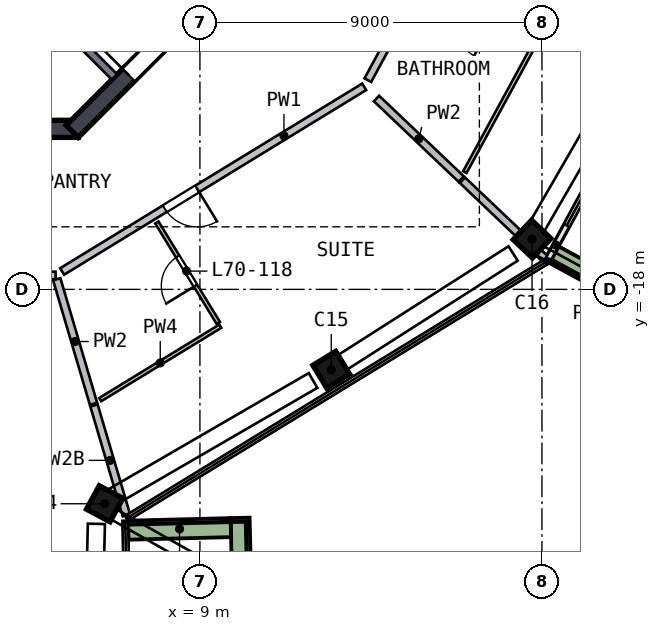
"""IFC4 building model, lengths in metres.
Left out: names, types, materials, properties, quantities, classifications, styles, units other than length and angle.
Written with IfcOpenShell. Run it as: python <this file> out.ifc"""

import sys

from ifc_helpers import new_model, si_unit, direction, frame, frame_2d, origin, origin_2d, place, context, subcontext, project, spatial, rectangle, extrude, element, fill, save


model = new_model("IFC4")
c1 = context("Model", 3, precision=1e-05, world=origin(), true_north=direction((0.0, 1.0)))
c2 = subcontext(c1, "Body", "Model", "MODEL_VIEW")
j1 = project(units=[si_unit("LENGTHUNIT", "METRE"), si_unit("PLANEANGLEUNIT", "RADIAN")], contexts=[c1])
p1 = place(None, origin())
s1 = spatial("IfcSite", under=j1, at=p1, CompositionType="ELEMENT")
p2 = place(p1, origin())
s2 = spatial("IfcBuilding", under=s1, at=p2, CompositionType="ELEMENT")
p3 = place(p2, frame((0.0, 0.0, 284.5)))
s3 = spatial("IfcBuildingStorey", under=s2, at=p3, CompositionType="ELEMENT", Elevation=284.5)
p4 = place(p3, frame((6.357, -23.679, 0.0), z_axis=(0.112271524, 0.03116542, 0.993188714), x_axis=(-0.47042906, -0.878735238, 0.080751965)))
e1 = element("IfcColumn", 1, at=p4, inside=s3, PredefinedType="COLUMN", context=c2, shape_type="SweptSolid", body=[
    extrude(rectangle(XDim=0.7, YDim=0.7, at=origin_2d()), origin(), (0.0, 0.0, 1.0), 3.212),
])
p5 = place(p3, frame((12.34, -20.185, 0.0), z_axis=(0.095516489, 0.05954571, 0.993645263), x_axis=(0.847642965, 0.518491285, -0.112553057)))
e2 = element("IfcColumn", 2, at=p5, inside=s3, PredefinedType="COLUMN", context=c2, shape_type="SweptSolid", body=[
    extrude(rectangle(XDim=0.7, YDim=0.7, at=origin_2d()), origin(), (0.0, 0.0, 1.0), 3.21),
])
p6 = place(p3, frame((17.644, -16.779, 0.0), z_axis=(0.079060431, 0.084609865, 0.993272681), x_axis=(-0.684283954, -0.719963223, 0.115794763)))
e3 = element("IfcColumn", 3, at=p6, inside=s3, PredefinedType="COLUMN", context=c2, shape_type="SweptSolid", body=[
    extrude(rectangle(XDim=0.7, YDim=0.7, at=origin_2d()), origin(), (0.0, 0.0, 1.0), 3.211),
])
p7 = place(p3, frame((-5.799, -13.775, 0.0), z_axis=(0.0, 0.0, 1.0), x_axis=(1.0, 0.0, 0.0)))
e4 = element("IfcWall", 4, at=p7, inside=s3, PredefinedType="SHEAR", context=c2, shape_type="SweptSolid", body=[
    extrude(rectangle(XDim=11.598, YDim=0.45, at=frame_2d((5.799, 0.0))), origin(), (0.0, 0.0, 1.0), 3.5),
])
p8 = place(p3, frame((5.64, -13.841, 0.0), z_axis=(0.0, 0.0, 1.0), x_axis=(0.707106781, 0.707106781, 0.0)))
e5 = element("IfcWall", 5, at=p8, inside=s3, PredefinedType="SHEAR", context=c2, shape_type="SweptSolid", body=[
    extrude(rectangle(XDim=11.598, YDim=0.45, at=frame_2d((5.799, 0.0))), origin(), (0.0, 0.0, 1.0), 3.5),
])
p9 = place(p8, frame((2.099, 0.0, 0.0)))
e6 = element("IfcOpeningElement", 6, at=p9, cuts=e5, PredefinedType="OPENING", context=c2, shape_type="SweptSolid", body=[
    extrude(rectangle(XDim=1.2, YDim=2.1, at=frame_2d((0.6, 1.05))), frame((0.0, 0.235, 0.0), z_axis=(0.0, -1.0, 0.0), x_axis=(1.0, 0.0, 0.0)), (0.0, 0.0, 1.0), 0.47),
])
p10 = place(p3, frame((18.181, -17.183, 0.0), z_axis=(0.0, 0.0, 1.0), x_axis=(0.478120193, 0.878294416, 0.0)))
e7 = element("IfcWall", 7, at=p10, inside=s3, PredefinedType="SOLIDWALL", context=c2, shape_type="SweptSolid", body=[
    extrude(rectangle(XDim=3.787, YDim=0.15, at=frame_2d((1.894, 0.0))), origin(), (0.0, 0.0, 1.0), 2.525),
])
p11 = place(p10, frame((0.987, 0.0, 0.0)))
e8 = element("IfcOpeningElement", 8, at=p11, cuts=e7, PredefinedType="OPENING", context=c2, shape_type="SweptSolid", body=[
    extrude(rectangle(XDim=2.4, YDim=2.4, at=frame_2d((1.2, 1.2))), frame((0.0, 0.085, 0.0), z_axis=(0.0, -1.0, 0.0), x_axis=(1.0, 0.0, 0.0)), (0.0, 0.0, 1.0), 0.17),
])
p12 = place(p3, frame((10.27, -32.506, 0.0), z_axis=(0.0, 0.0, 1.0), x_axis=(-0.025115681, 0.999684552, 0.0)))
e9 = element("IfcWall", 9, at=p12, inside=s3, PredefinedType="SOLIDWALL", context=c2, shape_type="SweptSolid", body=[
    extrude(rectangle(XDim=8.496, YDim=0.5, at=frame_2d((4.248, 0.0))), origin(), (0.0, 0.0, 1.0), 0.7),
])
p13 = place(p3, frame((9.813, -24.269, 0.0), z_axis=(0.0, 0.0, 1.0), x_axis=(-0.999683793, -0.025145864, 0.0)))
e10 = element("IfcWall", 10, at=p13, inside=s3, PredefinedType="SOLIDWALL", context=c2, shape_type="SweptSolid", body=[
    extrude(rectangle(XDim=2.699, YDim=0.5, at=frame_2d((1.35, 0.0))), origin(), (0.0, 0.0, 1.0), 0.7),
])
p14 = place(p3, frame((18.319, -17.087, 0.0), z_axis=(0.0, 0.0, 1.0), x_axis=(0.878332693, -0.478049873, 0.0)))
e11 = element("IfcWall", 11, at=p14, inside=s3, PredefinedType="SOLIDWALL", context=c2, shape_type="SweptSolid", body=[
    extrude(rectangle(XDim=3.199, YDim=0.5, at=frame_2d((1.6, 0.0))), origin(), (0.0, 0.0, 1.0), 0.7),
])
p15 = place(p3, frame((3.677, -9.334, 0.0), z_axis=(0.0, 0.0, 1.0), x_axis=(0.707106781, -0.707106781, 0.0)))
e12 = element("IfcWall", 12, at=p15, inside=s3, PredefinedType="SOLIDWALL", context=c2, shape_type="SweptSolid", body=[
    extrude(rectangle(XDim=4.35, YDim=0.2, at=frame_2d((2.175, 0.0))), origin(), (0.0, 0.0, 1.0), 3.19),
])
p16 = place(p3, frame((5.203, -17.633, 0.0), z_axis=(0.0, 0.0, 1.0), x_axis=(-0.999683918, -0.025140891, 0.0)))
e13 = element("IfcWall", 13, at=p16, inside=s3, PredefinedType="SOLIDWALL", context=c2, shape_type="SweptSolid", body=[
    extrude(rectangle(XDim=9.517, YDim=0.2, at=frame_2d((4.758, 0.0))), origin(), (0.0, 0.0, 1.0), 3.19),
])
p17 = place(p16, frame((3.838, 0.0, 0.0)))
e14 = element("IfcOpeningElement", 14, at=p17, cuts=e13, PredefinedType="OPENING", context=c2, shape_type="SweptSolid", body=[
    extrude(rectangle(XDim=1.8, YDim=2.1, at=frame_2d((0.9, 1.05))), frame((0.0, 0.11, 0.0), z_axis=(0.0, -1.0, 0.0), x_axis=(1.0, 0.0, 0.0)), (0.0, 0.0, 1.0), 0.22),
])
p18 = place(p3, frame((13.323, -12.669, 0.0), z_axis=(0.0, 0.0, 1.0), x_axis=(-0.853183358, -0.521611117, 0.0)))
e15 = element("IfcWall", 15, at=p18, inside=s3, PredefinedType="SOLIDWALL", context=c2, shape_type="SweptSolid", body=[
    extrude(rectangle(XDim=9.317, YDim=0.2, at=frame_2d((4.658, 0.0))), origin(), (0.0, 0.0, 1.0), 3.19),
])
p19 = place(p18, frame((5.15, 0.0, 0.0)))
e16 = element("IfcOpeningElement", 16, at=p19, cuts=e15, PredefinedType="OPENING", context=c2, shape_type="SweptSolid", body=[
    extrude(rectangle(XDim=1.0, YDim=2.1, at=frame_2d((0.5, 1.05))), frame((0.0, 0.11, 0.0), z_axis=(0.0, -1.0, 0.0), x_axis=(1.0, 0.0, 0.0)), (0.0, 0.0, 1.0), 0.22),
])
p20 = place(p3, frame((17.872, -4.311, 0.0), z_axis=(0.0, 0.0, 1.0), x_axis=(-0.478084491, -0.87831385, 0.0)))
e17 = element("IfcWall", 17, at=p20, inside=s3, PredefinedType="SOLIDWALL", context=c2, shape_type="SweptSolid", body=[
    extrude(rectangle(XDim=9.317, YDim=0.2, at=frame_2d((4.658, 0.0))), origin(), (0.0, 0.0, 1.0), 3.19),
])
p21 = place(p20, frame((5.15, 0.0, 0.0)))
e18 = element("IfcOpeningElement", 18, at=p21, cuts=e17, PredefinedType="OPENING", context=c2, shape_type="SweptSolid", body=[
    extrude(rectangle(XDim=1.0, YDim=2.1, at=frame_2d((0.5, 1.05))), frame((0.0, 0.11, 0.0), z_axis=(0.0, -1.0, 0.0), x_axis=(1.0, 0.0, 0.0)), (0.0, 0.0, 1.0), 0.22),
])
p22 = place(p3, frame((5.232, -17.732, 0.0), z_axis=(0.0, 0.0, 1.0), x_axis=(0.282974385, -0.959127467, 0.0)))
e19 = element("IfcWall", 19, at=p22, inside=s3, PredefinedType="SOLIDWALL", context=c2, shape_type="SweptSolid", body=[
    extrude(rectangle(XDim=3.418, YDim=0.2, at=frame_2d((1.709, 0.0))), origin(), (0.0, 0.0, 1.0), 3.19),
])
p23 = place(p3, frame((6.213, -21.055, 0.0), z_axis=(0.0, 0.0, 1.0), x_axis=(0.283008911, -0.95911728, 0.0)))
e20 = element("IfcWall", 20, at=p23, inside=s3, PredefinedType="SOLIDWALL", context=c2, shape_type="SweptSolid", body=[
    extrude(rectangle(XDim=3.011, YDim=0.2, at=frame_2d((1.506, 0.0))), origin(), (0.0, 0.0, 1.0), 2.69),
])
p24 = place(p3, frame((13.647, -12.977, 0.0), z_axis=(0.0, 0.0, 1.0), x_axis=(0.724630592, -0.689137509, 0.0)))
e21 = element("IfcWall", 21, at=p24, inside=s3, PredefinedType="SOLIDWALL", context=c2, shape_type="SweptSolid", body=[
    extrude(rectangle(XDim=3.075, YDim=0.2, at=frame_2d((1.537, 0.0))), origin(), (0.0, 0.0, 1.0), 3.19),
])
p25 = place(p3, frame((15.908, -15.128, 0.0), z_axis=(0.0, 0.0, 1.0), x_axis=(0.724639029, -0.689128636, 0.0)))
e22 = element("IfcWall", 22, at=p25, inside=s3, PredefinedType="SOLIDWALL", context=c2, shape_type="SweptSolid", body=[
    extrude(rectangle(XDim=3.011, YDim=0.2, at=frame_2d((1.506, 0.0))), origin(), (0.0, 0.0, 1.0), 3.19),
])
p26 = place(p3, frame((9.536, -18.969, 0.0), z_axis=(0.0, 0.0, 1.0), x_axis=(-0.853200356, -0.521583314, 0.0)))
e23 = element("IfcWall", 23, at=p26, inside=s3, PredefinedType="PARTITIONING", context=c2, shape_type="SweptSolid", body=[
    extrude(rectangle(XDim=3.704, YDim=0.1, at=frame_2d((1.852, 0.0))), origin(), (0.0, 0.0, 1.0), 3.19),
])
p27 = place(p3, frame((9.484, -18.884, 0.0), z_axis=(0.0, 0.0, 1.0), x_axis=(-0.521612471, 0.85318253, 0.0)))
e24 = element("IfcWall", 24, at=p27, inside=s3, PredefinedType="PARTITIONING", context=c2, shape_type="SweptSolid", body=[
    extrude(rectangle(XDim=3.1, YDim=0.1, at=frame_2d((1.55, 0.0))), origin(), (0.0, 0.0, 1.0), 3.19),
])
p28 = place(p27, frame((1.15, 0.0, 0.0)))
e25 = element("IfcOpeningElement", 25, at=p28, cuts=e24, PredefinedType="OPENING", context=c2, shape_type="SweptSolid", body=[
    extrude(rectangle(XDim=0.9, YDim=2.1, at=frame_2d((0.45, 1.05))), frame((0.0, 0.06, 0.0), z_axis=(0.0, -1.0, 0.0), x_axis=(1.0, 0.0, 0.0)), (0.0, 0.0, 1.0), 0.12),
])
p29 = place(p3, frame((17.743, -11.66, 0.0), z_axis=(0.0, 0.0, 1.0), x_axis=(-0.478053023, -0.878330978, 0.0)))
e26 = element("IfcWall", 26, at=p29, inside=s3, PredefinedType="PARTITIONING", context=c2, shape_type="SweptSolid", body=[
    extrude(rectangle(XDim=3.704, YDim=0.1, at=frame_2d((1.852, 0.0))), origin(), (0.0, 0.0, 1.0), 3.19),
])
p30 = place(p11, origin())
e27 = element("IfcDoor", 27, at=p30, inside=s3, OperationType="SLIDING_TO_LEFT", PredefinedType="DOOR", context=c2, shape_type="SweptSolid", body=[
    extrude(rectangle(XDim=2.4, YDim=2.4, at=frame_2d((1.2, 1.2))), frame((0.0, 0.025, 0.0), z_axis=(0.0, -1.0, 0.0), x_axis=(1.0, 0.0, 0.0)), (0.0, 0.0, 1.0), 0.05),
])
fill(e8, e27)
p31 = place(p9, origin())
e28 = element("IfcDoor", 28, at=p31, inside=s3, OperationType="SINGLE_SWING_LEFT", PredefinedType="DOOR", context=c2, shape_type="SweptSolid", body=[
    extrude(rectangle(XDim=1.2, YDim=2.1, at=frame_2d((0.6, 1.05))), frame((0.0, 0.025, 0.0), z_axis=(0.0, -1.0, 0.0), x_axis=(1.0, 0.0, 0.0)), (0.0, 0.0, 1.0), 0.05),
])
fill(e6, e28)
p32 = place(p19, origin())
e29 = element("IfcDoor", 29, at=p32, inside=s3, OperationType="SINGLE_SWING_LEFT", PredefinedType="DOOR", context=c2, shape_type="SweptSolid", body=[
    extrude(rectangle(XDim=1.0, YDim=2.1, at=frame_2d((0.5, 1.05))), frame((0.0, 0.025, 0.0), z_axis=(0.0, -1.0, 0.0), x_axis=(1.0, 0.0, 0.0)), (0.0, 0.0, 1.0), 0.05),
])
fill(e16, e29)
p33 = place(p28, origin())
e30 = element("IfcDoor", 30, at=p33, inside=s3, OperationType="SINGLE_SWING_LEFT", PredefinedType="DOOR", context=c2, shape_type="SweptSolid", body=[
    extrude(rectangle(XDim=0.9, YDim=2.1, at=frame_2d((0.45, 1.05))), frame((0.0, 0.025, 0.0), z_axis=(0.0, -1.0, 0.0), x_axis=(1.0, 0.0, 0.0)), (0.0, 0.0, 1.0), 0.05),
])
fill(e25, e30)
save(model, sys.argv[1])
